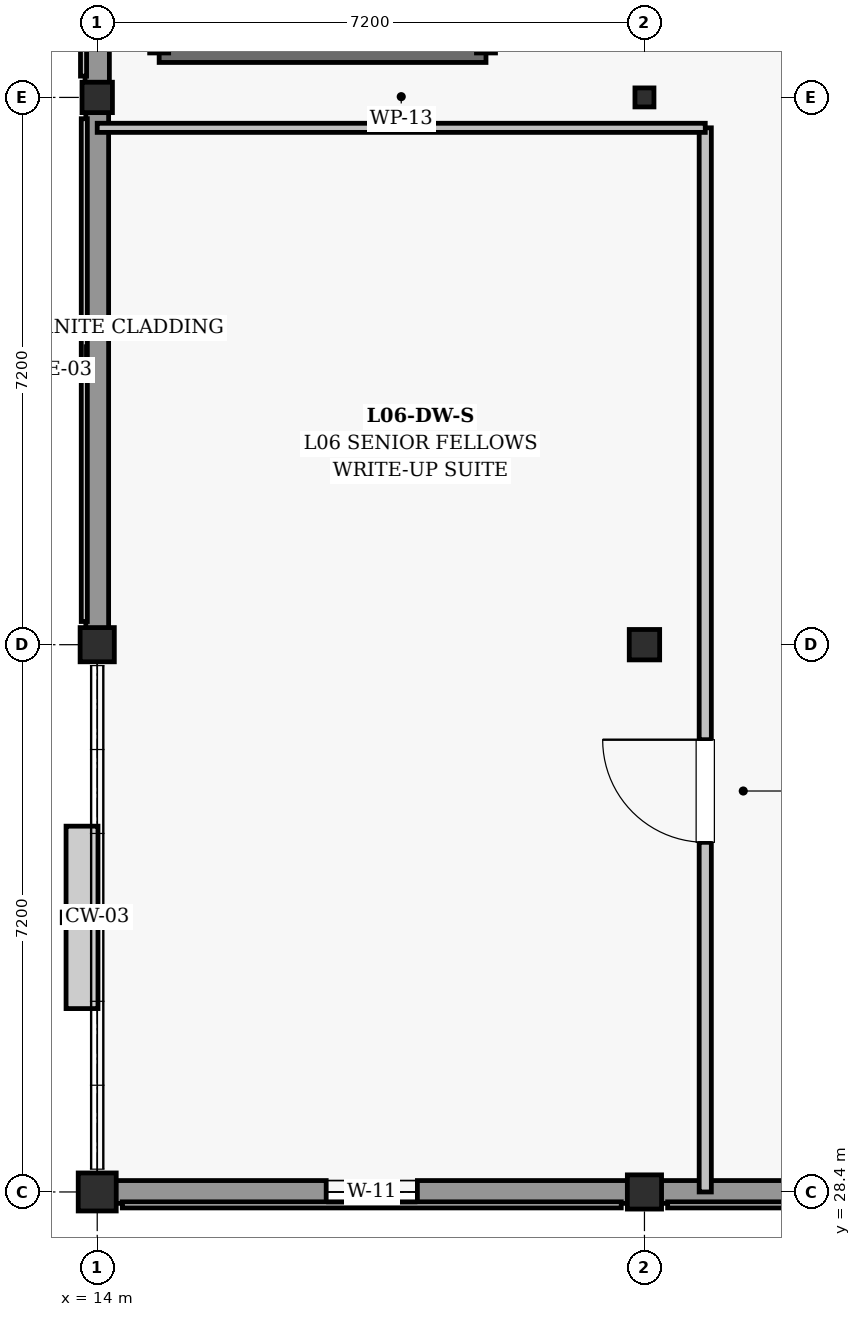
"""IFC4 building model, lengths in metres.
Left out: names, types, materials, properties, quantities, classifications, styles, units other than length and angle.
Written with IfcOpenShell. Run it as: python <this file> out.ifc"""

import sys

from ifc_helpers import new_model, si_unit, direction, frame, frame_2d, origin, origin_2d, place, context, subcontext, project, spatial, rectangle, i_section, extrude, element, fill, save


model = new_model("IFC4")
c1 = context("Model", 3, precision=1e-05, world=origin(), true_north=direction((0.0, 1.0)))
c2 = subcontext(c1, "Body", "Model", "MODEL_VIEW")
j1 = project(units=[si_unit("LENGTHUNIT", "METRE"), si_unit("PLANEANGLEUNIT", "RADIAN")], contexts=[c1])
p1 = place(None, origin())
s1 = spatial("IfcSite", under=j1, at=p1, CompositionType="ELEMENT")
p2 = place(p1, origin())
s2 = spatial("IfcBuilding", under=s1, at=p2, CompositionType="ELEMENT")
p3 = place(p2, frame((0.0, 0.0, 27.9)))
s3 = spatial("IfcBuildingStorey", under=s2, at=p3, CompositionType="ELEMENT", Elevation=27.9)
p4 = place(p3, frame((14.0, 28.4, 0.0), z_axis=(0.0, 0.0, 1.0), x_axis=(1.0, 0.0, 0.0)))
e1 = element("IfcColumn", 1, at=p4, inside=s3, PredefinedType="COLUMN", context=c2, shape_type="SweptSolid", body=[
    extrude(rectangle(XDim=0.5, YDim=0.5, at=origin_2d()), origin(), (0.0, 0.0, 1.0), 4.5),
])
p5 = place(p3, frame((14.0, 35.6, 0.0), z_axis=(0.0, 0.0, 1.0), x_axis=(1.0, 0.0, 0.0)))
e2 = element("IfcColumn", 2, at=p5, inside=s3, PredefinedType="COLUMN", context=c2, shape_type="SweptSolid", body=[
    extrude(rectangle(XDim=0.45, YDim=0.45, at=origin_2d()), origin(), (0.0, 0.0, 1.0), 4.5),
])
p6 = place(p3, frame((14.0, 42.8, 0.0), z_axis=(0.0, 0.0, 1.0), x_axis=(1.0, 0.0, 0.0)))
e3 = element("IfcColumn", 3, at=p6, inside=s3, PredefinedType="COLUMN", context=c2, shape_type="SweptSolid", body=[
    extrude(rectangle(XDim=0.4, YDim=0.4, at=origin_2d()), origin(), (0.0, 0.0, 1.0), 4.5),
])
p7 = place(p3, frame((21.2, 28.4, 0.0), z_axis=(0.0, 0.0, 1.0), x_axis=(1.0, 0.0, 0.0)))
e4 = element("IfcColumn", 4, at=p7, inside=s3, PredefinedType="COLUMN", context=c2, shape_type="SweptSolid", body=[
    extrude(rectangle(XDim=0.45, YDim=0.45, at=origin_2d()), origin(), (0.0, 0.0, 1.0), 4.5),
])
p8 = place(p3, frame((21.2, 35.6, 0.0), z_axis=(0.0, 0.0, 1.0), x_axis=(1.0, 0.0, 0.0)))
e5 = element("IfcColumn", 5, at=p8, inside=s3, PredefinedType="COLUMN", context=c2, shape_type="SweptSolid", body=[
    extrude(rectangle(XDim=0.4, YDim=0.4, at=origin_2d()), origin(), (0.0, 0.0, 1.0), 4.5),
])
p9 = place(p3, frame((21.2, 42.8, 0.0), z_axis=(0.0, 0.0, 1.0), x_axis=(1.0, 0.0, 0.0)))
e6 = element("IfcColumn", 6, at=p9, inside=s3, PredefinedType="COLUMN", context=c2, shape_type="SweptSolid", body=[
    extrude(i_section(OverallWidth=0.25, OverallDepth=0.25, WebThickness=0.009, FlangeThickness=0.01, FilletRadius=0.01, at=origin_2d()), origin(), (0.0, 0.0, 1.0), 4.5),
])
p10 = place(p3, frame((14.0, 35.805, 0.0), z_axis=(0.0, 0.0, 1.0), x_axis=(0.0, 1.0, 0.0)))
e7 = element("IfcWall", 7, at=p10, inside=s3, PredefinedType="SOLIDWALL", context=c2, shape_type="SweptSolid", body=[
    extrude(rectangle(XDim=6.815, YDim=0.3, at=frame_2d((3.408, 0.0))), origin(), (0.0, 0.0, 1.0), 3.355),
])
p11 = place(p3, frame((14.0, 42.98, 0.0), z_axis=(0.0, 0.0, 1.0), x_axis=(0.0, 1.0, 0.0)))
e8 = element("IfcWall", 8, at=p11, inside=s3, PredefinedType="SOLIDWALL", context=c2, shape_type="SweptSolid", body=[
    extrude(rectangle(XDim=6.815, YDim=0.32, at=frame_2d((3.407, 0.0))), origin(), (0.0, 0.0, 1.0), 3.355),
])
p12 = place(p3, frame((14.23, 28.4, 0.0), z_axis=(0.0, 0.0, 1.0), x_axis=(1.0, 0.0, 0.0)))
e9 = element("IfcWall", 9, at=p12, inside=s3, PredefinedType="SOLIDWALL", context=c2, shape_type="SweptSolid", body=[
    extrude(rectangle(XDim=6.765, YDim=0.3, at=frame_2d((3.383, 0.0))), origin(), (0.0, 0.0, 1.0), 3.555),
])
p13 = place(p12, frame((2.782, 0.0, 1.85)))
e10 = element("IfcOpeningElement", 10, at=p13, cuts=e9, PredefinedType="OPENING", context=c2, shape_type="SweptSolid", body=[
    extrude(rectangle(XDim=1.2, YDim=1.1, at=frame_2d((0.6, 0.55))), frame((0.0, 0.16, 0.0), z_axis=(0.0, -1.0, 0.0), x_axis=(1.0, 0.0, 0.0)), (0.0, 0.0, 1.0), 0.32),
])
p14 = place(p3, frame((21.405, 28.4, 0.0), z_axis=(0.0, 0.0, 1.0), x_axis=(1.0, 0.0, 0.0)))
e11 = element("IfcWall", 11, at=p14, inside=s3, PredefinedType="SOLIDWALL", context=c2, shape_type="SweptSolid", body=[
    extrude(rectangle(XDim=6.815, YDim=0.3, at=frame_2d((3.407, 0.0))), origin(), (0.0, 0.0, 1.0), 3.455),
])
p15 = place(p3, frame((14.815, 43.385, 0.0), z_axis=(0.0, 0.0, 1.0), x_axis=(1.0, 0.0, 0.0)))
e12 = element("IfcWall", 12, at=p15, inside=s3, PredefinedType="SHEAR", context=c2, shape_type="SweptSolid", body=[
    extrude(rectangle(XDim=4.3, YDim=0.25, at=frame_2d((2.15, 0.0))), origin(), (0.0, 0.0, 1.0), 4.195),
])
p16 = place(p3, frame((19.115, 43.385, 0.0), z_axis=(0.0, 0.0, 1.0), x_axis=(0.0, 1.0, 0.0)))
e13 = element("IfcWall", 13, at=p16, inside=s3, PredefinedType="SHEAR", context=c2, shape_type="SweptSolid", body=[
    extrude(rectangle(XDim=10.63, YDim=0.25, at=frame_2d((5.315, 0.0))), origin(), (0.0, 0.0, 1.0), 4.195),
])
p17 = place(p16, frame((0.55, 0.0, 0.0)))
e14 = element("IfcOpeningElement", 14, at=p17, cuts=e13, PredefinedType="OPENING", context=c2, shape_type="SweptSolid", body=[
    extrude(rectangle(XDim=1.2, YDim=2.15, at=frame_2d((0.6, 1.075))), frame((0.0, 0.135, 0.0), z_axis=(0.0, -1.0, 0.0), x_axis=(1.0, 0.0, 0.0)), (0.0, 0.0, 1.0), 0.27),
])
p18 = place(p3, frame((14.815, 54.015, 0.0), z_axis=(0.0, 0.0, 1.0), x_axis=(0.0, -1.0, 0.0)))
e15 = element("IfcWall", 15, at=p18, inside=s3, PredefinedType="SHEAR", context=c2, shape_type="SweptSolid", body=[
    extrude(rectangle(XDim=10.63, YDim=0.25, at=frame_2d((5.315, 0.0))), origin(), (0.0, 0.0, 1.0), 4.195),
])
p19 = place(p3, frame((22.0, 28.4, 0.0), z_axis=(0.0, 0.0, 1.0), x_axis=(0.0, 1.0, 0.0)))
e16 = element("IfcWall", 16, at=p19, inside=s3, PredefinedType="PARTITIONING", context=c2, shape_type="SweptSolid", body=[
    extrude(rectangle(XDim=14.0, YDim=0.16, at=frame_2d((7.0, 0.0))), origin(), (0.0, 0.0, 1.0), 3.46),
])
p20 = place(p19, frame((4.6, 0.0, 0.0)))
e17 = element("IfcOpeningElement", 17, at=p20, cuts=e16, PredefinedType="OPENING", context=c2, shape_type="SweptSolid", body=[
    extrude(rectangle(XDim=1.35, YDim=2.2, at=frame_2d((0.675, 1.1))), frame((0.0, 0.09, 0.0), z_axis=(0.0, -1.0, 0.0), x_axis=(1.0, 0.0, 0.0)), (0.0, 0.0, 1.0), 0.18),
])
p21 = place(p3, frame((14.0, 42.4, 0.0), z_axis=(0.0, 0.0, 1.0), x_axis=(1.0, 0.0, 0.0)))
e18 = element("IfcWall", 18, at=p21, inside=s3, PredefinedType="PARTITIONING", context=c2, shape_type="SweptSolid", body=[
    extrude(rectangle(XDim=8.0, YDim=0.12, at=frame_2d((4.0, 0.0))), origin(), (0.0, 0.0, 1.0), 3.56),
])
p22 = place(p13, origin())
e19 = element("IfcWindow", 19, at=p22, inside=s3, PartitioningType="SINGLE_PANEL", PredefinedType="WINDOW", context=c2, shape_type="SweptSolid", body=[
    extrude(rectangle(XDim=1.2, YDim=1.1, at=frame_2d((0.6, 0.55))), frame((0.0, 0.03, 0.0), z_axis=(0.0, -1.0, 0.0), x_axis=(1.0, 0.0, 0.0)), (0.0, 0.0, 1.0), 0.06),
])
fill(e10, e19)
p23 = place(p20, origin())
e20 = element("IfcDoor", 20, at=p23, inside=s3, OperationType="SINGLE_SWING_RIGHT", PredefinedType="DOOR", context=c2, shape_type="SweptSolid", body=[
    extrude(rectangle(XDim=1.35, YDim=2.2, at=frame_2d((0.675, 1.1))), frame((0.0, 0.025, 0.0), z_axis=(0.0, -1.0, 0.0), x_axis=(1.0, 0.0, 0.0)), (0.0, 0.0, 1.0), 0.05),
])
fill(e17, e20)
save(model, sys.argv[1])
